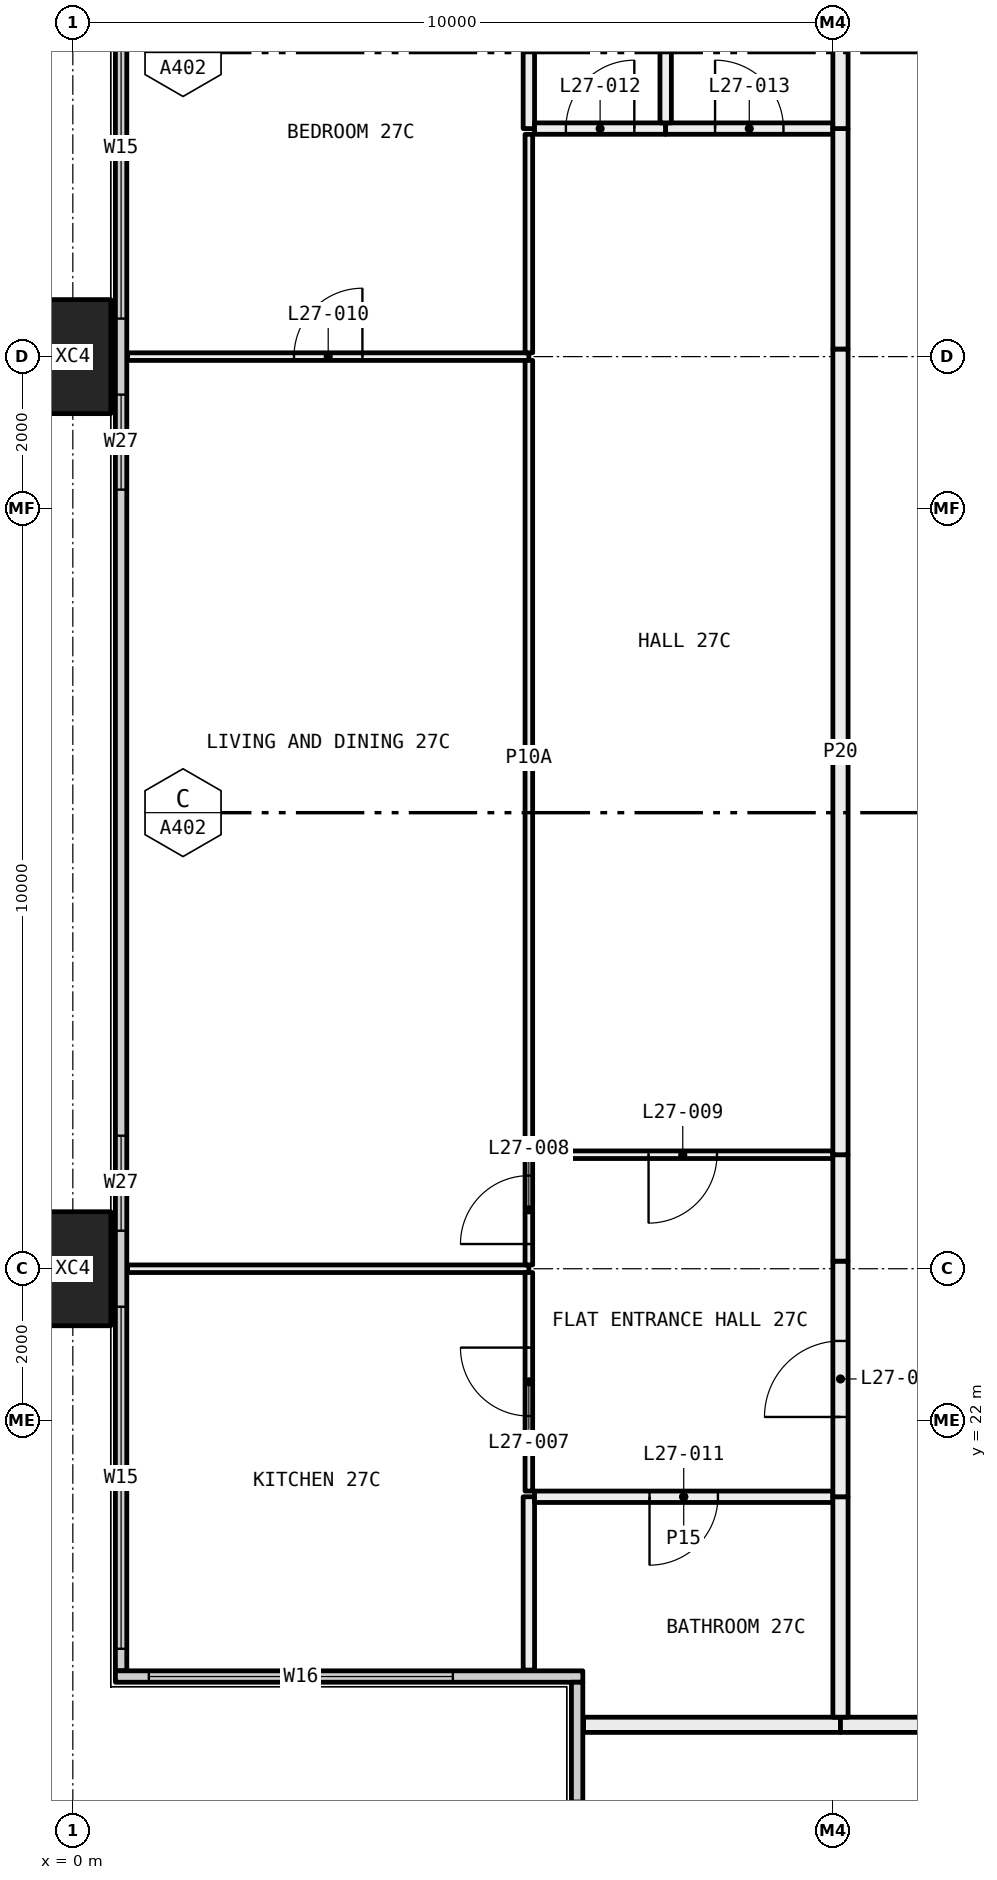
"""IFC4 building model, lengths in metres.
Left out: names, types, materials, properties, quantities, classifications, styles, units other than length and angle.
Written with IfcOpenShell. Run it as: python <this file> out.ifc"""

import sys

from ifc_helpers import new_model, si_unit, direction, frame, frame_2d, origin, origin_2d, place, context, subcontext, project, spatial, rectangle, hollow_rectangle, extrude, element, fill, save


model = new_model("IFC4")
c1 = context("Model", 3, precision=1e-05, world=origin(), true_north=direction((0.0, 1.0)))
c2 = subcontext(c1, "Body", "Model", "MODEL_VIEW")
j1 = project(units=[si_unit("LENGTHUNIT", "METRE"), si_unit("PLANEANGLEUNIT", "RADIAN")], contexts=[c1])
p1 = place(None, origin())
s1 = spatial("IfcSite", under=j1, at=p1, CompositionType="ELEMENT")
p2 = place(p1, origin())
s2 = spatial("IfcBuilding", under=s1, at=p2, CompositionType="ELEMENT")
p3 = place(p2, frame((0.0, 0.0, 106.95)))
s3 = spatial("IfcBuildingStorey", under=s2, at=p3, CompositionType="ELEMENT", Elevation=106.95)
for number, where, z_axis, x_axis in (
    (1, (0.0, 24.0, -0.4), (0.0, 0.0, 1.0), (0.0, 1.0, 0.0)),
    (2, (0.0, 36.0, -0.4), (0.0, 0.0, 1.0), (0.0, 1.0, 0.0)),
):
    element("IfcColumn", number, at=place(p3, frame(where, z_axis=z_axis, x_axis=x_axis)), inside=s3, PredefinedType="COLUMN", context=c2, shape_type="SweptSolid", body=[
        extrude(hollow_rectangle(XDim=1.5, YDim=1.0, WallThickness=0.06, at=origin_2d()), origin(), (0.0, 0.0, 1.0), 3.45),
    ])
p4 = place(p3, frame((0.635, 18.71, 0.0), z_axis=(0.0, 0.0, 1.0), x_axis=(0.0, 1.0, 0.0)))
e3 = element("IfcWall", 3, at=p4, inside=s3, PredefinedType="ELEMENTEDWALL", context=c2, shape_type="SweptSolid", body=[
    extrude(rectangle(XDim=22.58, YDim=0.15, at=frame_2d((11.29, 0.0))), origin(), (0.0, 0.0, 1.0), 3.05),
])
p5 = place(p4, frame((0.29, 0.0, 0.45)))
e4 = element("IfcOpeningElement", 4, at=p5, cuts=e3, PredefinedType="OPENING", context=c2, shape_type="SweptSolid", body=[
    extrude(rectangle(XDim=4.5, YDim=2.55, at=frame_2d((2.25, 1.275))), frame((0.0, 0.085, 0.0), z_axis=(0.0, -1.0, 0.0), x_axis=(1.0, 0.0, 0.0)), (0.0, 0.0, 1.0), 0.17),
])
p6 = place(p4, frame((5.79, 0.0, 0.45)))
e5 = element("IfcOpeningElement", 5, at=p6, cuts=e3, PredefinedType="OPENING", context=c2, shape_type="SweptSolid", body=[
    extrude(rectangle(XDim=1.25, YDim=2.55, at=frame_2d((0.625, 1.275))), frame((0.0, 0.085, 0.0), z_axis=(0.0, -1.0, 0.0), x_axis=(1.0, 0.0, 0.0)), (0.0, 0.0, 1.0), 0.17),
])
p7 = place(p4, frame((15.54, 0.0, 0.45)))
e6 = element("IfcOpeningElement", 6, at=p7, cuts=e3, PredefinedType="OPENING", context=c2, shape_type="SweptSolid", body=[
    extrude(rectangle(XDim=1.25, YDim=2.55, at=frame_2d((0.625, 1.275))), frame((0.0, 0.085, 0.0), z_axis=(0.0, -1.0, 0.0), x_axis=(1.0, 0.0, 0.0)), (0.0, 0.0, 1.0), 0.17),
])
p8 = place(p4, frame((17.79, 0.0, 0.45)))
e7 = element("IfcOpeningElement", 7, at=p8, cuts=e3, PredefinedType="OPENING", context=c2, shape_type="SweptSolid", body=[
    extrude(rectangle(XDim=4.5, YDim=2.55, at=frame_2d((2.25, 1.275))), frame((0.0, 0.085, 0.0), z_axis=(0.0, -1.0, 0.0), x_axis=(1.0, 0.0, 0.0)), (0.0, 0.0, 1.0), 0.17),
])
p9 = place(p3, frame((0.56, 18.635, 0.0), z_axis=(0.0, 0.0, 1.0), x_axis=(1.0, 0.0, 0.0)))
e8 = element("IfcWall", 8, at=p9, inside=s3, PredefinedType="ELEMENTEDWALL", context=c2, shape_type="SweptSolid", body=[
    extrude(rectangle(XDim=6.15, YDim=0.15, at=frame_2d((3.075, 0.0))), origin(), (0.0, 0.0, 1.0), 3.05),
])
p10 = place(p9, frame((0.44, 0.0, 0.45)))
e9 = element("IfcOpeningElement", 9, at=p10, cuts=e8, PredefinedType="OPENING", context=c2, shape_type="SweptSolid", body=[
    extrude(rectangle(XDim=4.0, YDim=2.55, at=frame_2d((2.0, 1.275))), frame((0.0, 0.085, 0.0), z_axis=(0.0, -1.0, 0.0), x_axis=(1.0, 0.0, 0.0)), (0.0, 0.0, 1.0), 0.17),
])
p11 = place(p3, frame((6.635, 12.71, 0.0), z_axis=(0.0, 0.0, 1.0), x_axis=(0.0, 1.0, 0.0)))
e10 = element("IfcWall", 10, at=p11, inside=s3, PredefinedType="ELEMENTEDWALL", context=c2, shape_type="SweptSolid", body=[
    extrude(rectangle(XDim=5.85, YDim=0.15, at=frame_2d((2.925, 0.0))), origin(), (0.0, 0.0, 1.0), 3.05),
])
p12 = place(p11, frame((0.29, 0.0, 0.45)))
e11 = element("IfcOpeningElement", 11, at=p12, cuts=e10, PredefinedType="OPENING", context=c2, shape_type="SweptSolid", body=[
    extrude(rectangle(XDim=4.0, YDim=2.55, at=frame_2d((2.0, 1.275))), frame((0.0, 0.085, 0.0), z_axis=(0.0, -1.0, 0.0), x_axis=(1.0, 0.0, 0.0)), (0.0, 0.0, 1.0), 0.17),
])
p13 = place(p3, frame((10.1, 18.0, 0.0), z_axis=(0.0, 0.0, 1.0), x_axis=(-1.0, 0.0, 0.0)))
e12 = element("IfcWall", 12, at=p13, inside=s3, PredefinedType="PARTITIONING", context=c2, shape_type="SweptSolid", body=[
    extrude(rectangle(XDim=3.38, YDim=0.2, at=frame_2d((1.69, 0.0))), origin(), (0.0, 0.0, 1.0), 3.05),
])
p14 = place(p3, frame((12.0, 18.0, 0.0), z_axis=(0.0, 0.0, 1.0), x_axis=(-1.0, 0.0, 0.0)))
e13 = element("IfcWall", 13, at=p14, inside=s3, PredefinedType="PARTITIONING", context=c2, shape_type="SweptSolid", body=[
    extrude(rectangle(XDim=1.9, YDim=0.2, at=frame_2d((0.95, 0.0))), origin(), (0.0, 0.0, 1.0), 3.05),
])
p15 = place(p3, frame((6.0, 24.0, 0.0), z_axis=(0.0, 0.0, 1.0), x_axis=(-1.0, 0.0, 0.0)))
e14 = element("IfcWall", 14, at=p15, inside=s3, PredefinedType="PARTITIONING", context=c2, shape_type="SweptSolid", body=[
    extrude(rectangle(XDim=5.28, YDim=0.1, at=frame_2d((2.64, 0.0))), origin(), (0.0, 0.0, 1.0), 2.45),
])
p16 = place(p3, frame((6.0, 18.72, 0.0), z_axis=(0.0, 0.0, 1.0), x_axis=(0.0, 1.0, 0.0)))
e15 = element("IfcWall", 15, at=p16, inside=s3, PredefinedType="PARTITIONING", context=c2, shape_type="SweptSolid", body=[
    extrude(rectangle(XDim=2.28, YDim=0.15, at=frame_2d((1.14, 0.0))), origin(), (0.0, 0.0, 1.0), 3.05),
])
p17 = place(p3, frame((6.0, 21.075, 0.0), z_axis=(0.0, 0.0, 1.0), x_axis=(0.0, 1.0, 0.0)))
e16 = element("IfcWall", 16, at=p17, inside=s3, PredefinedType="PARTITIONING", context=c2, shape_type="SweptSolid", body=[
    extrude(rectangle(XDim=2.875, YDim=0.1, at=frame_2d((1.438, 0.0))), origin(), (0.0, 0.0, 1.0), 2.45),
])
p18 = place(p17, frame((0.988, 0.0, 0.0)))
e17 = element("IfcOpeningElement", 17, at=p18, cuts=e16, PredefinedType="OPENING", context=c2, shape_type="SweptSolid", body=[
    extrude(rectangle(XDim=0.9, YDim=2.1, at=frame_2d((0.45, 1.05))), frame((0.0, 0.06, 0.0), z_axis=(0.0, -1.0, 0.0), x_axis=(1.0, 0.0, 0.0)), (0.0, 0.0, 1.0), 0.12),
])
p19 = place(p3, frame((6.0, 36.0, 0.0), z_axis=(0.0, 0.0, 1.0), x_axis=(-1.0, 0.0, 0.0)))
e18 = element("IfcWall", 18, at=p19, inside=s3, PredefinedType="PARTITIONING", context=c2, shape_type="SweptSolid", body=[
    extrude(rectangle(XDim=5.28, YDim=0.1, at=frame_2d((2.64, 0.0))), origin(), (0.0, 0.0, 1.0), 2.45),
])
p20 = place(p19, frame((2.19, 0.0, 0.0)))
e19 = element("IfcOpeningElement", 19, at=p20, cuts=e18, PredefinedType="OPENING", context=c2, shape_type="SweptSolid", body=[
    extrude(rectangle(XDim=0.9, YDim=2.1, at=frame_2d((0.45, 1.05))), frame((0.0, 0.06, 0.0), z_axis=(0.0, -1.0, 0.0), x_axis=(1.0, 0.0, 0.0)), (0.0, 0.0, 1.0), 0.12),
])
p21 = place(p3, frame((6.0, 24.05, 0.0), z_axis=(0.0, 0.0, 1.0), x_axis=(0.0, 1.0, 0.0)))
e20 = element("IfcWall", 20, at=p21, inside=s3, PredefinedType="PARTITIONING", context=c2, shape_type="SweptSolid", body=[
    extrude(rectangle(XDim=1.45, YDim=0.1, at=frame_2d((0.725, 0.0))), origin(), (0.0, 0.0, 1.0), 2.45),
])
p22 = place(p21, frame((0.275, 0.0, 0.0)))
e21 = element("IfcOpeningElement", 21, at=p22, cuts=e20, PredefinedType="OPENING", context=c2, shape_type="SweptSolid", body=[
    extrude(rectangle(XDim=0.9, YDim=2.1, at=frame_2d((0.45, 1.05))), frame((0.0, 0.06, 0.0), z_axis=(0.0, -1.0, 0.0), x_axis=(1.0, 0.0, 0.0)), (0.0, 0.0, 1.0), 0.12),
])
p23 = place(p3, frame((6.0, 25.5, 0.0), z_axis=(0.0, 0.0, 1.0), x_axis=(0.0, 1.0, 0.0)))
e22 = element("IfcWall", 22, at=p23, inside=s3, PredefinedType="PARTITIONING", context=c2, shape_type="SweptSolid", body=[
    extrude(rectangle(XDim=10.45, YDim=0.1, at=frame_2d((5.225, 0.0))), origin(), (0.0, 0.0, 1.0), 2.45),
])
p24 = place(p3, frame((6.0, 36.05, 0.0), z_axis=(0.0, 0.0, 1.0), x_axis=(0.0, 1.0, 0.0)))
e23 = element("IfcWall", 23, at=p24, inside=s3, PredefinedType="PARTITIONING", context=c2, shape_type="SweptSolid", body=[
    extrude(rectangle(XDim=2.875, YDim=0.1, at=frame_2d((1.438, 0.0))), origin(), (0.0, 0.0, 1.0), 2.45),
])
p25 = place(p3, frame((6.0, 39.0, 0.0), z_axis=(0.0, 0.0, 1.0), x_axis=(0.0, 1.0, 0.0)))
e24 = element("IfcWall", 24, at=p25, inside=s3, PredefinedType="PARTITIONING", context=c2, shape_type="SweptSolid", body=[
    extrude(rectangle(XDim=2.28, YDim=0.15, at=frame_2d((1.14, 0.0))), origin(), (0.0, 0.0, 1.0), 3.05),
])
p26 = place(p3, frame((10.0, 21.0, 0.0), z_axis=(0.0, 0.0, 1.0), x_axis=(-1.0, 0.0, 0.0)))
e25 = element("IfcWall", 25, at=p26, inside=s3, PredefinedType="PARTITIONING", context=c2, shape_type="SweptSolid", body=[
    extrude(rectangle(XDim=3.925, YDim=0.15, at=frame_2d((1.962, 0.0))), origin(), (0.0, 0.0, 1.0), 3.05),
])
p27 = place(p26, frame((1.512, 0.0, 0.0)))
e26 = element("IfcOpeningElement", 26, at=p27, cuts=e25, PredefinedType="OPENING", context=c2, shape_type="SweptSolid", body=[
    extrude(rectangle(XDim=0.9, YDim=2.1, at=frame_2d((0.45, 1.05))), frame((0.0, 0.085, 0.0), z_axis=(0.0, -1.0, 0.0), x_axis=(1.0, 0.0, 0.0)), (0.0, 0.0, 1.0), 0.17),
])
p28 = place(p3, frame((10.1, 18.1, 0.0), z_axis=(0.0, 0.0, 1.0), x_axis=(0.0, 1.0, 0.0)))
e27 = element("IfcWall", 27, at=p28, inside=s3, PredefinedType="PARTITIONING", context=c2, shape_type="SweptSolid", body=[
    extrude(rectangle(XDim=2.9, YDim=0.2, at=frame_2d((1.45, 0.0))), origin(), (0.0, 0.0, 1.0), 3.05),
])
p29 = place(p3, frame((10.0, 25.5, 0.0), z_axis=(0.0, 0.0, 1.0), x_axis=(-1.0, 0.0, 0.0)))
e28 = element("IfcWall", 28, at=p29, inside=s3, PredefinedType="PARTITIONING", context=c2, shape_type="SweptSolid", body=[
    extrude(rectangle(XDim=3.95, YDim=0.1, at=frame_2d((1.975, 0.0))), origin(), (0.0, 0.0, 1.0), 3.05),
])
p30 = place(p29, frame((1.525, 0.0, 0.0)))
e29 = element("IfcOpeningElement", 29, at=p30, cuts=e28, PredefinedType="OPENING", context=c2, shape_type="SweptSolid", body=[
    extrude(rectangle(XDim=0.9, YDim=2.1, at=frame_2d((0.45, 1.05))), frame((0.0, 0.06, 0.0), z_axis=(0.0, -1.0, 0.0), x_axis=(1.0, 0.0, 0.0)), (0.0, 0.0, 1.0), 0.12),
])
p31 = place(p3, frame((10.1, 21.0, 0.0), z_axis=(0.0, 0.0, 1.0), x_axis=(0.0, 1.0, 0.0)))
e30 = element("IfcWall", 30, at=p31, inside=s3, PredefinedType="PARTITIONING", context=c2, shape_type="SweptSolid", body=[
    extrude(rectangle(XDim=3.1, YDim=0.2, at=frame_2d((1.55, 0.0))), origin(), (0.0, 0.0, 1.0), 2.45),
])
p32 = place(p31, frame((1.05, 0.0, 0.0)))
e31 = element("IfcOpeningElement", 31, at=p32, cuts=e30, PredefinedType="OPENING", context=c2, shape_type="SweptSolid", body=[
    extrude(rectangle(XDim=1.0, YDim=2.1, at=frame_2d((0.5, 1.05))), frame((0.0, 0.11, 0.0), z_axis=(0.0, -1.0, 0.0), x_axis=(1.0, 0.0, 0.0)), (0.0, 0.0, 1.0), 0.22),
])
p33 = place(p3, frame((10.1, 24.1, 0.0), z_axis=(0.0, 0.0, 1.0), x_axis=(0.0, 1.0, 0.0)))
e32 = element("IfcWall", 32, at=p33, inside=s3, PredefinedType="PARTITIONING", context=c2, shape_type="SweptSolid", body=[
    extrude(rectangle(XDim=1.4, YDim=0.2, at=frame_2d((0.7, 0.0))), origin(), (0.0, 0.0, 1.0), 3.05),
])
p34 = place(p3, frame((7.8, 39.0, 0.0), z_axis=(0.0, 0.0, 1.0), x_axis=(-1.0, 0.0, 0.0)))
e33 = element("IfcWall", 33, at=p34, inside=s3, PredefinedType="PARTITIONING", context=c2, shape_type="SweptSolid", body=[
    extrude(rectangle(XDim=1.725, YDim=0.15, at=frame_2d((0.863, 0.0))), origin(), (0.0, 0.0, 1.0), 3.05),
])
p35 = place(p34, frame((0.413, 0.0, 0.0)))
e34 = element("IfcOpeningElement", 34, at=p35, cuts=e33, PredefinedType="OPENING", context=c2, shape_type="SweptSolid", body=[
    extrude(rectangle(XDim=0.9, YDim=2.1, at=frame_2d((0.45, 1.05))), frame((0.0, 0.085, 0.0), z_axis=(0.0, -1.0, 0.0), x_axis=(1.0, 0.0, 0.0)), (0.0, 0.0, 1.0), 0.17),
])
p36 = place(p3, frame((10.0, 39.0, 0.0), z_axis=(0.0, 0.0, 1.0), x_axis=(-1.0, 0.0, 0.0)))
e35 = element("IfcWall", 35, at=p36, inside=s3, PredefinedType="PARTITIONING", context=c2, shape_type="SweptSolid", body=[
    extrude(rectangle(XDim=2.2, YDim=0.15, at=frame_2d((1.1, 0.0))), origin(), (0.0, 0.0, 1.0), 3.05),
])
p37 = place(p36, frame((0.65, 0.0, 0.0)))
e36 = element("IfcOpeningElement", 36, at=p37, cuts=e35, PredefinedType="OPENING", context=c2, shape_type="SweptSolid", body=[
    extrude(rectangle(XDim=0.9, YDim=2.1, at=frame_2d((0.45, 1.05))), frame((0.0, 0.085, 0.0), z_axis=(0.0, -1.0, 0.0), x_axis=(1.0, 0.0, 0.0)), (0.0, 0.0, 1.0), 0.17),
])
p38 = place(p3, frame((10.1, 25.5, 0.0), z_axis=(0.0, 0.0, 1.0), x_axis=(0.0, 1.0, 0.0)))
e37 = element("IfcWall", 37, at=p38, inside=s3, PredefinedType="PARTITIONING", context=c2, shape_type="SweptSolid", body=[
    extrude(rectangle(XDim=10.6, YDim=0.2, at=frame_2d((5.3, 0.0))), origin(), (0.0, 0.0, 1.0), 2.45),
])
p39 = place(p3, frame((10.1, 36.1, 0.0), z_axis=(0.0, 0.0, 1.0), x_axis=(0.0, 1.0, 0.0)))
e38 = element("IfcWall", 38, at=p39, inside=s3, PredefinedType="PARTITIONING", context=c2, shape_type="SweptSolid", body=[
    extrude(rectangle(XDim=2.9, YDim=0.2, at=frame_2d((1.45, 0.0))), origin(), (0.0, 0.0, 1.0), 3.05),
])
p40 = place(p3, frame((7.8, 39.075, 0.0), z_axis=(0.0, 0.0, 1.0), x_axis=(0.0, 1.0, 0.0)))
e39 = element("IfcWall", 39, at=p40, inside=s3, PredefinedType="PARTITIONING", context=c2, shape_type="SweptSolid", body=[
    extrude(rectangle(XDim=2.825, YDim=0.15, at=frame_2d((1.413, 0.0))), origin(), (0.0, 0.0, 1.0), 3.05),
])
p41 = place(p3, frame((10.1, 39.0, 0.0), z_axis=(0.0, 0.0, 1.0), x_axis=(0.0, 1.0, 0.0)))
e40 = element("IfcWall", 40, at=p41, inside=s3, PredefinedType="PARTITIONING", context=c2, shape_type="SweptSolid", body=[
    extrude(rectangle(XDim=2.9, YDim=0.2, at=frame_2d((1.45, 0.0))), origin(), (0.0, 0.0, 1.0), 3.05),
])
p42 = place(p5, origin())
e41 = element("IfcWindow", 41, at=p42, inside=s3, PartitioningType="SINGLE_PANEL", PredefinedType="WINDOW", context=c2, shape_type="SweptSolid", body=[
    extrude(rectangle(XDim=4.5, YDim=2.55, at=frame_2d((2.25, 1.275))), frame((0.0, 0.03, 0.0), z_axis=(0.0, -1.0, 0.0), x_axis=(1.0, 0.0, 0.0)), (0.0, 0.0, 1.0), 0.06),
])
fill(e4, e41)
p43 = place(p6, origin())
e42 = element("IfcWindow", 42, at=p43, inside=s3, PartitioningType="SINGLE_PANEL", PredefinedType="WINDOW", context=c2, shape_type="SweptSolid", body=[
    extrude(rectangle(XDim=1.25, YDim=2.55, at=frame_2d((0.625, 1.275))), frame((0.0, 0.03, 0.0), z_axis=(0.0, -1.0, 0.0), x_axis=(1.0, 0.0, 0.0)), (0.0, 0.0, 1.0), 0.06),
])
fill(e5, e42)
p44 = place(p7, origin())
e43 = element("IfcWindow", 43, at=p44, inside=s3, PartitioningType="SINGLE_PANEL", PredefinedType="WINDOW", context=c2, shape_type="SweptSolid", body=[
    extrude(rectangle(XDim=1.25, YDim=2.55, at=frame_2d((0.625, 1.275))), frame((0.0, 0.03, 0.0), z_axis=(0.0, -1.0, 0.0), x_axis=(1.0, 0.0, 0.0)), (0.0, 0.0, 1.0), 0.06),
])
fill(e6, e43)
p45 = place(p8, origin())
e44 = element("IfcWindow", 44, at=p45, inside=s3, PartitioningType="SINGLE_PANEL", PredefinedType="WINDOW", context=c2, shape_type="SweptSolid", body=[
    extrude(rectangle(XDim=4.5, YDim=2.55, at=frame_2d((2.25, 1.275))), frame((0.0, 0.03, 0.0), z_axis=(0.0, -1.0, 0.0), x_axis=(1.0, 0.0, 0.0)), (0.0, 0.0, 1.0), 0.06),
])
fill(e7, e44)
p46 = place(p10, origin())
e45 = element("IfcWindow", 45, at=p46, inside=s3, PartitioningType="SINGLE_PANEL", PredefinedType="WINDOW", context=c2, shape_type="SweptSolid", body=[
    extrude(rectangle(XDim=4.0, YDim=2.55, at=frame_2d((2.0, 1.275))), frame((0.0, 0.03, 0.0), z_axis=(0.0, -1.0, 0.0), x_axis=(1.0, 0.0, 0.0)), (0.0, 0.0, 1.0), 0.06),
])
fill(e9, e45)
p47 = place(p32, origin())
e46 = element("IfcDoor", 46, at=p47, inside=s3, OperationType="SINGLE_SWING_RIGHT", PredefinedType="DOOR", context=c2, shape_type="SweptSolid", body=[
    extrude(rectangle(XDim=1.0, YDim=2.1, at=frame_2d((0.5, 1.05))), frame((0.0, 0.025, 0.0), z_axis=(0.0, -1.0, 0.0), x_axis=(1.0, 0.0, 0.0)), (0.0, 0.0, 1.0), 0.05),
])
fill(e31, e46)
p48 = place(p18, origin())
e47 = element("IfcDoor", 47, at=p48, inside=s3, OperationType="SINGLE_SWING_LEFT", PredefinedType="DOOR", context=c2, shape_type="SweptSolid", body=[
    extrude(rectangle(XDim=0.9, YDim=2.1, at=frame_2d((0.45, 1.05))), frame((0.0, 0.025, 0.0), z_axis=(0.0, -1.0, 0.0), x_axis=(1.0, 0.0, 0.0)), (0.0, 0.0, 1.0), 0.05),
])
fill(e17, e47)
p49 = place(p22, origin())
e48 = element("IfcDoor", 48, at=p49, inside=s3, OperationType="SINGLE_SWING_RIGHT", PredefinedType="DOOR", context=c2, shape_type="SweptSolid", body=[
    extrude(rectangle(XDim=0.9, YDim=2.1, at=frame_2d((0.45, 1.05))), frame((0.0, 0.025, 0.0), z_axis=(0.0, -1.0, 0.0), x_axis=(1.0, 0.0, 0.0)), (0.0, 0.0, 1.0), 0.05),
])
fill(e21, e48)
p50 = place(p30, origin())
e49 = element("IfcDoor", 49, at=p50, inside=s3, OperationType="SINGLE_SWING_LEFT", PredefinedType="DOOR", context=c2, shape_type="SweptSolid", body=[
    extrude(rectangle(XDim=0.9, YDim=2.1, at=frame_2d((0.45, 1.05))), frame((0.0, 0.025, 0.0), z_axis=(0.0, -1.0, 0.0), x_axis=(1.0, 0.0, 0.0)), (0.0, 0.0, 1.0), 0.05),
])
fill(e29, e49)
p51 = place(p20, frame((0.9, 0.0, 0.0), x_axis=(-1.0, 0.0, 0.0)))
e50 = element("IfcDoor", 50, at=p51, inside=s3, OperationType="SINGLE_SWING_LEFT", PredefinedType="DOOR", context=c2, shape_type="SweptSolid", body=[
    extrude(rectangle(XDim=0.9, YDim=2.1, at=frame_2d((0.45, 1.05))), frame((0.0, 0.025, 0.0), z_axis=(0.0, -1.0, 0.0), x_axis=(1.0, 0.0, 0.0)), (0.0, 0.0, 1.0), 0.05),
])
fill(e19, e50)
p52 = place(p27, origin())
e51 = element("IfcDoor", 51, at=p52, inside=s3, OperationType="SINGLE_SWING_LEFT", PredefinedType="DOOR", context=c2, shape_type="SweptSolid", body=[
    extrude(rectangle(XDim=0.9, YDim=2.1, at=frame_2d((0.45, 1.05))), frame((0.0, 0.025, 0.0), z_axis=(0.0, -1.0, 0.0), x_axis=(1.0, 0.0, 0.0)), (0.0, 0.0, 1.0), 0.05),
])
fill(e26, e51)
p53 = place(p35, frame((0.9, 0.0, 0.0), x_axis=(-1.0, 0.0, 0.0)))
e52 = element("IfcDoor", 52, at=p53, inside=s3, OperationType="SINGLE_SWING_LEFT", PredefinedType="DOOR", context=c2, shape_type="SweptSolid", body=[
    extrude(rectangle(XDim=0.9, YDim=2.1, at=frame_2d((0.45, 1.05))), frame((0.0, 0.025, 0.0), z_axis=(0.0, -1.0, 0.0), x_axis=(1.0, 0.0, 0.0)), (0.0, 0.0, 1.0), 0.05),
])
fill(e34, e52)
p54 = place(p37, frame((0.9, 0.0, 0.0), x_axis=(-1.0, 0.0, 0.0)))
e53 = element("IfcDoor", 53, at=p54, inside=s3, OperationType="SINGLE_SWING_RIGHT", PredefinedType="DOOR", context=c2, shape_type="SweptSolid", body=[
    extrude(rectangle(XDim=0.9, YDim=2.1, at=frame_2d((0.45, 1.05))), frame((0.0, 0.025, 0.0), z_axis=(0.0, -1.0, 0.0), x_axis=(1.0, 0.0, 0.0)), (0.0, 0.0, 1.0), 0.05),
])
fill(e36, e53)
save(model, sys.argv[1])
